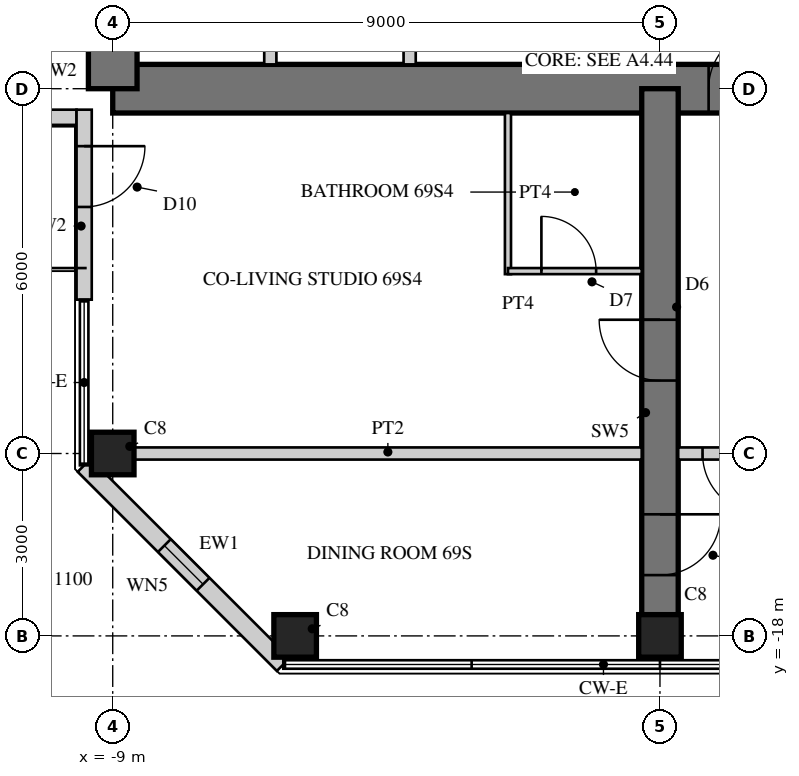
"""IFC4 building model, lengths in metres.
Left out: names, types, materials, properties, quantities, classifications, styles, units other than length and angle.
Written with IfcOpenShell. Run it as: python <this file> out.ifc"""

import sys

from ifc_helpers import new_model, si_unit, direction, frame, frame_2d, origin, origin_2d, place, context, subcontext, project, spatial, rectangle, hollow_rectangle, extrude, element, fill, save


model = new_model("IFC4")
c1 = context("Model", 3, precision=1e-05, world=origin(), true_north=direction((0.0, 1.0)))
c2 = subcontext(c1, "Body", "Model", "MODEL_VIEW")
j1 = project(units=[si_unit("LENGTHUNIT", "METRE"), si_unit("PLANEANGLEUNIT", "RADIAN")], contexts=[c1])
p1 = place(None, origin())
s1 = spatial("IfcSite", under=j1, at=p1, CompositionType="ELEMENT")
p2 = place(p1, origin())
s2 = spatial("IfcBuilding", under=s1, at=p2, CompositionType="ELEMENT")
p3 = place(p2, frame((0.0, 0.0, 267.9)))
s3 = spatial("IfcBuildingStorey", under=s2, at=p3, CompositionType="ELEMENT", Elevation=267.9)
p4 = place(p3, frame((-9.0, -9.0, 0.0), z_axis=(0.0, 0.0, 1.0), x_axis=(1.0, 0.0, 0.0)))
e1 = element("IfcWall", 1, at=p4, inside=s3, PredefinedType="SHEAR", context=c2, shape_type="SweptSolid", body=[
    extrude(rectangle(XDim=18.0, YDim=0.8, at=frame_2d((9.0, 0.0))), origin(), (0.0, 0.0, 1.0), 3.4),
])
p5 = place(p4, frame((9.8, 0.0, 0.0)))
e2 = element("IfcOpeningElement", 2, at=p5, cuts=e1, PredefinedType="OPENING", context=c2, shape_type="SweptSolid", body=[
    extrude(rectangle(XDim=1.0, YDim=2.4, at=frame_2d((0.5, 1.2))), frame((0.0, 0.41, 0.0), z_axis=(0.0, -1.0, 0.0), x_axis=(1.0, 0.0, 0.0)), (0.0, 0.0, 1.0), 0.82),
])
p6 = place(p3, frame((-9.0, 9.0, 0.0), z_axis=(0.0, 0.0, 1.0), x_axis=(0.0, -1.0, 0.0)))
e3 = element("IfcWall", 3, at=p6, inside=s3, PredefinedType="SHEAR", context=c2, shape_type="SweptSolid", body=[
    extrude(rectangle(XDim=18.0, YDim=0.8, at=frame_2d((9.0, 0.0))), origin(), (0.0, 0.0, 1.0), 3.4),
])
p7 = place(p6, frame((9.8, 0.0, 0.0)))
e4 = element("IfcOpeningElement", 4, at=p7, cuts=e3, PredefinedType="OPENING", context=c2, shape_type="SweptSolid", body=[
    extrude(rectangle(XDim=1.0, YDim=2.4, at=frame_2d((0.5, 1.2))), frame((0.0, 0.41, 0.0), z_axis=(0.0, -1.0, 0.0), x_axis=(1.0, 0.0, 0.0)), (0.0, 0.0, 1.0), 0.82),
])
p8 = place(p3, frame((-1.8, -1.875, 0.0), z_axis=(0.0, 0.0, 1.0), x_axis=(0.0, -1.0, 0.0)))
e5 = element("IfcWall", 5, at=p8, inside=s3, PredefinedType="SHEAR", context=c2, shape_type="SweptSolid", body=[
    extrude(rectangle(XDim=6.725, YDim=0.25, at=frame_2d((3.363, 0.0))), origin(), (0.0, 0.0, 1.0), 3.4),
])
p9 = place(p8, frame((1.875, 0.0, 0.0)))
e6 = element("IfcOpeningElement", 6, at=p9, cuts=e5, PredefinedType="OPENING", context=c2, shape_type="SweptSolid", body=[
    extrude(rectangle(XDim=1.6, YDim=2.4, at=frame_2d((0.8, 1.2))), frame((0.0, 0.135, 0.0), z_axis=(0.0, -1.0, 0.0), x_axis=(1.0, 0.0, 0.0)), (0.0, 0.0, 1.0), 0.27),
])
for number, where, z_axis, x_axis in (
    (7, (-4.117, -5.975, 0.0), (0.0, 0.0, 1.0), (0.0, -1.0, 0.0)),
    (8, (-6.408, -5.975, 0.0), (0.0, 0.0, 1.0), (0.0, -1.0, 0.0)),
):
    element("IfcWall", number, at=place(p3, frame(where, z_axis=z_axis, x_axis=x_axis)), inside=s3, PredefinedType="PARTITIONING", context=c2, shape_type="SweptSolid", body=[
        extrude(rectangle(XDim=2.625, YDim=0.2, at=frame_2d((1.312, 0.0))), origin(), (0.0, 0.0, 1.0), 3.4),
    ])
p10 = place(p3, frame((0.0, -9.0, 0.0), z_axis=(0.0, 0.0, 1.0), x_axis=(0.0, -1.0, 0.0)))
e9 = element("IfcWall", 9, at=p10, inside=s3, PredefinedType="SHEAR", context=c2, shape_type="SweptSolid", body=[
    extrude(rectangle(XDim=9.0, YDim=0.6, at=frame_2d((4.5, 0.0))), origin(), (0.0, 0.0, 1.0), 3.4),
])
p11 = place(p10, frame((3.8, 0.0, 0.0)))
e10 = element("IfcOpeningElement", 10, at=p11, cuts=e9, PredefinedType="OPENING", context=c2, shape_type="SweptSolid", body=[
    extrude(rectangle(XDim=1.0, YDim=2.15, at=frame_2d((0.5, 1.075))), frame((0.0, 0.31, 0.0), z_axis=(0.0, -1.0, 0.0), x_axis=(1.0, 0.0, 0.0)), (0.0, 0.0, 1.0), 0.62),
])
p12 = place(p10, frame((7.0, 0.0, 0.0)))
e11 = element("IfcOpeningElement", 11, at=p12, cuts=e9, PredefinedType="OPENING", context=c2, shape_type="SweptSolid", body=[
    extrude(rectangle(XDim=1.0, YDim=2.2, at=frame_2d((0.5, 1.1))), frame((0.0, 0.31, 0.0), z_axis=(0.0, -1.0, 0.0), x_axis=(1.0, 0.0, 0.0)), (0.0, 0.0, 1.0), 0.62),
])
for number, where, z_axis, x_axis in (
    (12, (-9.0, -15.0, 0.0), (0.0, 0.0, 1.0), (1.0, 0.0, 0.0)),
    (13, (-6.0, -18.0, 0.0), (0.0, 0.0, 1.0), (1.0, 0.0, 0.0)),
    (14, (0.0, -18.0, 0.0), (0.0, 0.0, 1.0), (1.0, 0.0, 0.0)),
):
    element("IfcColumn", number, at=place(p3, frame(where, z_axis=z_axis, x_axis=x_axis)), inside=s3, PredefinedType="COLUMN", context=c2, shape_type="SweptSolid", body=[
        extrude(rectangle(XDim=0.7, YDim=0.7, at=origin_2d()), origin(), (0.0, 0.0, 1.0), 3.4),
    ])
p13 = place(p3, frame((-12.47, -9.47, 0.0), z_axis=(0.0, 0.0, 1.0), x_axis=(1.0, 0.0, 0.0)))
e15 = element("IfcWall", 15, at=p13, inside=s3, PredefinedType="SOLIDWALL", context=c2, shape_type="SweptSolid", body=[
    extrude(rectangle(XDim=2.875, YDim=0.25, at=frame_2d((1.438, 0.0))), origin(), (0.0, 0.0, 1.0), 3.22),
])
p14 = place(p13, frame((0.6, 0.0, 0.0)))
e16 = element("IfcOpeningElement", 16, at=p14, cuts=e15, PredefinedType="OPENING", context=c2, shape_type="SweptSolid", body=[
    extrude(rectangle(XDim=1.0, YDim=2.2, at=frame_2d((0.5, 1.1))), frame((0.0, 0.135, 0.0), z_axis=(0.0, -1.0, 0.0), x_axis=(1.0, 0.0, 0.0)), (0.0, 0.0, 1.0), 0.27),
])
p15 = place(p3, frame((-9.47, -9.345, 0.0), z_axis=(0.0, 0.0, 1.0), x_axis=(0.0, -1.0, 0.0)))
e17 = element("IfcWall", 17, at=p15, inside=s3, PredefinedType="SOLIDWALL", context=c2, shape_type="SweptSolid", body=[
    extrude(rectangle(XDim=3.125, YDim=0.25, at=frame_2d((1.562, 0.0))), origin(), (0.0, 0.0, 1.0), 3.22),
])
p16 = place(p15, frame((0.6, 0.0, 0.0)))
e18 = element("IfcOpeningElement", 18, at=p16, cuts=e17, PredefinedType="OPENING", context=c2, shape_type="SweptSolid", body=[
    extrude(rectangle(XDim=1.0, YDim=2.2, at=frame_2d((0.5, 1.1))), frame((0.0, 0.135, 0.0), z_axis=(0.0, -1.0, 0.0), x_axis=(1.0, 0.0, 0.0)), (0.0, 0.0, 1.0), 0.27),
])
p17 = place(p3, frame((-9.47, -15.195, 0.0), z_axis=(0.0, 0.0, 1.0), x_axis=(0.707106781187, -0.707106781187, 0.0)))
e19 = element("IfcWall", 19, at=p17, inside=s3, PredefinedType="SOLIDWALL", context=c2, shape_type="SweptSolid", body=[
    extrude(rectangle(XDim=4.632, YDim=0.3, at=frame_2d((2.316, 0.0))), origin(), (0.0, 0.0, 1.0), 3.22),
])
p18 = place(p17, frame((1.866, 0.0, 0.3)))
e20 = element("IfcOpeningElement", 20, at=p18, cuts=e19, PredefinedType="OPENING", context=c2, shape_type="SweptSolid", body=[
    extrude(rectangle(XDim=0.9, YDim=2.4, at=frame_2d((0.45, 1.2))), frame((0.0, 0.16, 0.0), z_axis=(0.0, -1.0, 0.0), x_axis=(1.0, 0.0, 0.0)), (0.0, 0.0, 1.0), 0.32),
])
p19 = place(p3, frame((0.0, -5.675, 0.0), z_axis=(0.0, 0.0, 1.0), x_axis=(0.0, -1.0, 0.0)))
e21 = element("IfcWall", 21, at=p19, inside=s3, PredefinedType="PARTITIONING", context=c2, shape_type="SweptSolid", body=[
    extrude(rectangle(XDim=2.925, YDim=0.15, at=frame_2d((1.462, 0.0))), origin(), (0.0, 0.0, 1.0), 3.22),
])
p20 = place(p19, frame((0.4, 0.0, 0.0)))
e22 = element("IfcOpeningElement", 22, at=p20, cuts=e21, PredefinedType="OPENING", context=c2, shape_type="SweptSolid", body=[
    extrude(rectangle(XDim=1.0, YDim=2.1, at=frame_2d((0.5, 1.05))), frame((0.0, 0.085, 0.0), z_axis=(0.0, -1.0, 0.0), x_axis=(1.0, 0.0, 0.0)), (0.0, 0.0, 1.0), 0.17),
])
p21 = place(p3, frame((-2.5, -9.4, 0.0), z_axis=(0.0, 0.0, 1.0), x_axis=(0.0, -1.0, 0.0)))
e23 = element("IfcWall", 23, at=p21, inside=s3, PredefinedType="PARTITIONING", context=c2, shape_type="SweptSolid", body=[
    extrude(rectangle(XDim=2.65, YDim=0.1, at=frame_2d((1.325, 0.0))), origin(), (0.0, 0.0, 1.0), 3.22),
])
p22 = place(p3, frame((-2.5, -12.0, 0.0), z_axis=(0.0, 0.0, 1.0), x_axis=(1.0, 0.0, 0.0)))
e24 = element("IfcWall", 24, at=p22, inside=s3, PredefinedType="PARTITIONING", context=c2, shape_type="SweptSolid", body=[
    extrude(rectangle(XDim=2.2, YDim=0.1, at=frame_2d((1.1, 0.0))), origin(), (0.0, 0.0, 1.0), 3.22),
])
p23 = place(p22, frame((0.55, 0.0, 0.0)))
e25 = element("IfcOpeningElement", 25, at=p23, cuts=e24, PredefinedType="OPENING", context=c2, shape_type="SweptSolid", body=[
    extrude(rectangle(XDim=0.9, YDim=2.1, at=frame_2d((0.45, 1.05))), frame((0.0, 0.06, 0.0), z_axis=(0.0, -1.0, 0.0), x_axis=(1.0, 0.0, 0.0)), (0.0, 0.0, 1.0), 0.12),
])
p24 = place(p3, frame((-8.65, -15.0, 0.0), z_axis=(0.0, 0.0, 1.0), x_axis=(1.0, 0.0, 0.0)))
e26 = element("IfcWall", 26, at=p24, inside=s3, PredefinedType="SOLIDWALL", context=c2, shape_type="SweptSolid", body=[
    extrude(rectangle(XDim=8.35, YDim=0.2, at=frame_2d((4.175, 0.0))), origin(), (0.0, 0.0, 1.0), 2.52),
])
p25 = place(p3, frame((0.3, -15.0, 0.0), z_axis=(0.0, 0.0, 1.0), x_axis=(1.0, 0.0, 0.0)))
e27 = element("IfcWall", 27, at=p25, inside=s3, PredefinedType="SOLIDWALL", context=c2, shape_type="SweptSolid", body=[
    extrude(rectangle(XDim=8.35, YDim=0.2, at=frame_2d((4.175, 0.0))), origin(), (0.0, 0.0, 1.0), 2.52),
])
p26 = place(p25, frame((0.4, 0.0, 0.0)))
e28 = element("IfcOpeningElement", 28, at=p26, cuts=e27, PredefinedType="OPENING", context=c2, shape_type="SweptSolid", body=[
    extrude(rectangle(XDim=1.0, YDim=2.2, at=frame_2d((0.5, 1.1))), frame((0.0, 0.11, 0.0), z_axis=(0.0, -1.0, 0.0), x_axis=(1.0, 0.0, 0.0)), (0.0, 0.0, 1.0), 0.22),
])
p27 = place(p16, origin())
e29 = element("IfcDoor", 29, at=p27, inside=s3, OperationType="SINGLE_SWING_LEFT", PredefinedType="DOOR", context=c2, shape_type="SweptSolid", body=[
    extrude(hollow_rectangle(XDim=1.0, YDim=2.2, WallThickness=0.06, at=frame_2d((0.5, 1.1))), frame((0.0, 0.025, 0.0), z_axis=(0.0, -1.0, 0.0), x_axis=(1.0, 0.0, 0.0)), (0.0, 0.0, 1.0), 0.05),
    extrude(rectangle(XDim=0.879, YDim=2.079, at=frame_2d((0.5, 1.1))), frame((0.0, 0.025, 0.0), z_axis=(0.0, -1.0, 0.0), x_axis=(1.0, 0.0, 0.0)), (0.0, 0.0, 1.0), 0.05),
])
fill(e18, e29)
p28 = place(p18, origin())
e30 = element("IfcWindow", 30, at=p28, inside=s3, PartitioningType="SINGLE_PANEL", PredefinedType="WINDOW", context=c2, shape_type="SweptSolid", body=[
    extrude(hollow_rectangle(XDim=0.9, YDim=2.4, WallThickness=0.06, at=frame_2d((0.45, 1.2))), frame((0.0, 0.03, 0.0), z_axis=(0.0, -1.0, 0.0), x_axis=(1.0, 0.0, 0.0)), (0.0, 0.0, 1.0), 0.06),
    extrude(rectangle(XDim=0.779, YDim=2.279, at=frame_2d((0.45, 1.2))), frame((0.0, 0.03, 0.0), z_axis=(0.0, -1.0, 0.0), x_axis=(1.0, 0.0, 0.0)), (0.0, 0.0, 1.0), 0.06),
])
fill(e20, e30)
p29 = place(p23, origin())
e31 = element("IfcDoor", 31, at=p29, inside=s3, OperationType="SINGLE_SWING_LEFT", PredefinedType="DOOR", context=c2, shape_type="SweptSolid", body=[
    extrude(rectangle(XDim=0.9, YDim=2.1, at=frame_2d((0.45, 1.05))), frame((0.0, 0.025, 0.0), z_axis=(0.0, -1.0, 0.0), x_axis=(1.0, 0.0, 0.0)), (0.0, 0.0, 1.0), 0.05),
])
fill(e25, e31)
p30 = place(p26, frame((1.0, 0.0, 0.0), z_axis=(0.0, 0.0, 1.0), x_axis=(-1.0, 0.0, 0.0)))
e32 = element("IfcDoor", 32, at=p30, inside=s3, OperationType="SINGLE_SWING_LEFT", PredefinedType="DOOR", context=c2, shape_type="SweptSolid", body=[
    extrude(rectangle(XDim=1.0, YDim=2.2, at=frame_2d((0.5, 1.1))), frame((0.0, 0.025, 0.0), z_axis=(0.0, -1.0, 0.0), x_axis=(1.0, 0.0, 0.0)), (0.0, 0.0, 1.0), 0.05),
])
fill(e28, e32)
p31 = place(p11, frame((1.0, 0.0, 0.0), z_axis=(0.0, 0.0, 1.0), x_axis=(-1.0, 0.0, 0.0)))
e33 = element("IfcDoor", 33, at=p31, inside=s3, OperationType="SINGLE_SWING_RIGHT", PredefinedType="DOOR", context=c2, shape_type="SweptSolid", body=[
    extrude(rectangle(XDim=1.0, YDim=2.15, at=frame_2d((0.5, 1.075))), frame((0.0, 0.025, 0.0), z_axis=(0.0, -1.0, 0.0), x_axis=(1.0, 0.0, 0.0)), (0.0, 0.0, 1.0), 0.05),
])
fill(e10, e33)
p32 = place(p12, origin())
e34 = element("IfcDoor", 34, at=p32, inside=s3, OperationType="SINGLE_SWING_LEFT", PredefinedType="DOOR", context=c2, shape_type="SweptSolid", body=[
    extrude(rectangle(XDim=1.0, YDim=2.2, at=frame_2d((0.5, 1.1))), frame((0.0, 0.025, 0.0), z_axis=(0.0, -1.0, 0.0), x_axis=(1.0, 0.0, 0.0)), (0.0, 0.0, 1.0), 0.05),
])
fill(e11, e34)
p33 = place(p5, origin())
e35 = element("IfcDoor", 35, at=p33, inside=s3, OperationType="SINGLE_SWING_RIGHT", PredefinedType="DOOR", context=c2, shape_type="SweptSolid", body=[
    extrude(rectangle(XDim=1.0, YDim=2.4, at=frame_2d((0.5, 1.2))), frame((0.0, 0.055, 0.0), z_axis=(0.0, -1.0, 0.0), x_axis=(1.0, 0.0, 0.0)), (0.0, 0.0, 1.0), 0.05),
])
fill(e2, e35)
save(model, sys.argv[1])
